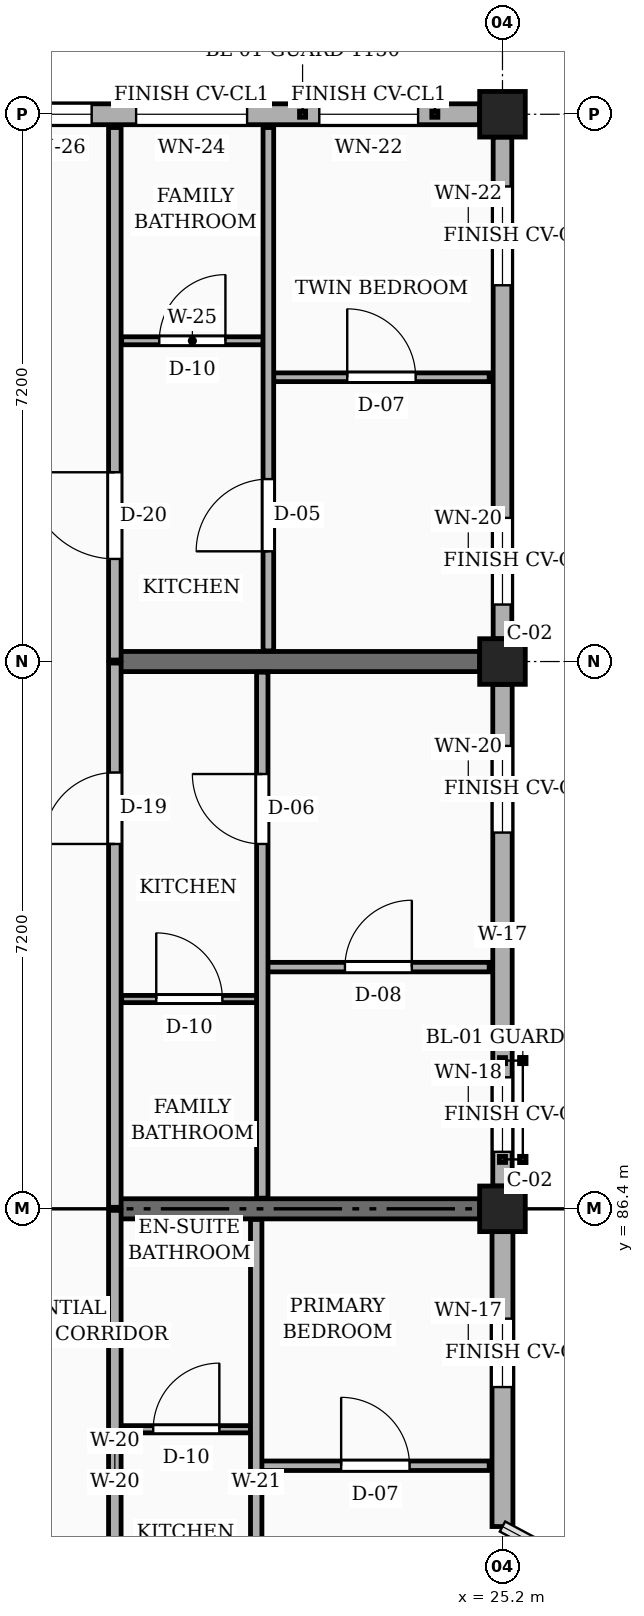
"""IFC4 building model, lengths in metres.
Left out: names, types, materials, properties, quantities, classifications, styles, units other than length and angle.
Written with IfcOpenShell. Run it as: python <this file> out.ifc"""

import sys

from ifc_helpers import new_model, si_unit, direction, frame, frame_2d, origin, origin_2d, place, context, subcontext, project, spatial, rectangle, extrude, element, fill, save


model = new_model("IFC4")
c1 = context("Model", 3, precision=1e-05, world=origin(), true_north=direction((0.0, 1.0)))
c2 = subcontext(c1, "Body", "Model", "MODEL_VIEW")
j1 = project(units=[si_unit("LENGTHUNIT", "METRE"), si_unit("PLANEANGLEUNIT", "RADIAN")], contexts=[c1])
p1 = place(None, origin())
s1 = spatial("IfcSite", under=j1, at=p1, CompositionType="ELEMENT")
p2 = place(p1, origin())
s2 = spatial("IfcBuilding", under=s1, at=p2, CompositionType="ELEMENT")
p3 = place(p2, frame((0.0, 0.0, 7.65)))
s3 = spatial("IfcBuildingStorey", under=s2, at=p3, CompositionType="ELEMENT", Elevation=7.65)
for number, where, z_axis, x_axis in (
    (1, (25.2, 86.4, 0.0), (0.0, 0.0, 1.0), (1.0, 0.0, 0.0)),
    (2, (25.2, 93.6, 0.0), (0.0, 0.0, 1.0), (1.0, 0.0, 0.0)),
    (3, (25.2, 100.8, 0.0), (0.0, 0.0, 1.0), (1.0, 0.0, 0.0)),
):
    element("IfcColumn", number, at=place(p3, frame(where, z_axis=z_axis, x_axis=x_axis)), inside=s3, PredefinedType="COLUMN", context=c2, shape_type="SweptSolid", body=[
        extrude(rectangle(XDim=0.6, YDim=0.6, at=origin_2d()), origin(), (0.0, 0.0, 1.0), 3.15),
    ])
for number, where, z_axis, x_axis in (
    (4, (20.1, 86.4, 0.0), (0.0, 0.0, 1.0), (1.0, 0.0, 0.0)),
    (5, (20.1, 93.6, 0.0), (0.0, 0.0, 1.0), (1.0, 0.0, 0.0)),
):
    element("IfcWall", number, at=place(p3, frame(where, z_axis=z_axis, x_axis=x_axis)), inside=s3, PredefinedType="SOLIDWALL", context=c2, shape_type="SweptSolid", body=[
        extrude(rectangle(XDim=4.8, YDim=0.265, at=frame_2d((2.4, 0.0))), origin(), (0.0, 0.0, 1.0), 2.21),
    ])
p4 = place(p3, frame((25.2, 82.22, 0.0), z_axis=(0.0, 0.0, 1.0), x_axis=(0.0, 1.0, 0.0)))
e6 = element("IfcWall", 6, at=p4, inside=s3, PredefinedType="SOLIDWALL", context=c2, shape_type="SweptSolid", body=[
    extrude(rectangle(XDim=3.88, YDim=0.275, at=frame_2d((1.94, 0.0))), origin(), (0.0, 0.0, 1.0), 2.48),
])
p5 = place(p4, frame((1.835, 0.0, 0.78)))
e7 = element("IfcOpeningElement", 7, at=p5, cuts=e6, PredefinedType="OPENING", context=c2, shape_type="SweptSolid", body=[
    extrude(rectangle(XDim=0.9, YDim=1.36, at=frame_2d((0.45, 0.68))), frame((0.0, 0.147, 0.0), z_axis=(0.0, -1.0, 0.0), x_axis=(1.0, 0.0, 0.0)), (0.0, 0.0, 1.0), 0.295),
])
p6 = place(p3, frame((25.2, 86.7, 0.0), z_axis=(0.0, 0.0, 1.0), x_axis=(0.0, 1.0, 0.0)))
e8 = element("IfcWall", 8, at=p6, inside=s3, PredefinedType="SOLIDWALL", context=c2, shape_type="SweptSolid", body=[
    extrude(rectangle(XDim=6.6, YDim=0.255, at=frame_2d((3.3, 0.0))), origin(), (0.0, 0.0, 1.0), 2.48),
])
p7 = place(p6, frame((0.45, 0.0, 0.78)))
e9 = element("IfcOpeningElement", 9, at=p7, cuts=e8, PredefinedType="OPENING", context=c2, shape_type="SweptSolid", body=[
    extrude(rectangle(XDim=0.98, YDim=1.36, at=frame_2d((0.49, 0.68))), frame((0.0, 0.137, 0.0), z_axis=(0.0, -1.0, 0.0), x_axis=(1.0, 0.0, 0.0)), (0.0, 0.0, 1.0), 0.275),
])
p8 = place(p6, frame((4.65, 0.0, 0.78)))
e10 = element("IfcOpeningElement", 10, at=p8, cuts=e8, PredefinedType="OPENING", context=c2, shape_type="SweptSolid", body=[
    extrude(rectangle(XDim=1.14, YDim=1.36, at=frame_2d((0.57, 0.68))), frame((0.0, 0.137, 0.0), z_axis=(0.0, -1.0, 0.0), x_axis=(1.0, 0.0, 0.0)), (0.0, 0.0, 1.0), 0.275),
])
p9 = place(p3, frame((25.2, 93.9, 0.0), z_axis=(0.0, 0.0, 1.0), x_axis=(0.0, 1.0, 0.0)))
e11 = element("IfcWall", 11, at=p9, inside=s3, PredefinedType="SOLIDWALL", context=c2, shape_type="SweptSolid", body=[
    extrude(rectangle(XDim=6.6, YDim=0.245, at=frame_2d((3.3, 0.0))), origin(), (0.0, 0.0, 1.0), 2.48),
])
p10 = place(p9, frame((0.45, 0.0, 0.78)))
e12 = element("IfcOpeningElement", 12, at=p10, cuts=e11, PredefinedType="OPENING", context=c2, shape_type="SweptSolid", body=[
    extrude(rectangle(XDim=1.14, YDim=1.36, at=frame_2d((0.57, 0.68))), frame((0.0, 0.133, 0.0), z_axis=(0.0, -1.0, 0.0), x_axis=(1.0, 0.0, 0.0)), (0.0, 0.0, 1.0), 0.265),
])
p11 = place(p9, frame((4.65, 0.0, 0.78)))
e13 = element("IfcOpeningElement", 13, at=p11, cuts=e11, PredefinedType="OPENING", context=c2, shape_type="SweptSolid", body=[
    extrude(rectangle(XDim=1.3, YDim=1.36, at=frame_2d((0.65, 0.68))), frame((0.0, 0.133, 0.0), z_axis=(0.0, -1.0, 0.0), x_axis=(1.0, 0.0, 0.0)), (0.0, 0.0, 1.0), 0.265),
])
p12 = place(p3, frame((24.9, 100.8, 0.0), z_axis=(0.0, 0.0, 1.0), x_axis=(-1.0, 0.0, 0.0)))
e14 = element("IfcWall", 14, at=p12, inside=s3, PredefinedType="SOLIDWALL", context=c2, shape_type="SweptSolid", body=[
    extrude(rectangle(XDim=6.6, YDim=0.275, at=frame_2d((3.3, 0.0))), origin(), (0.0, 0.0, 1.0), 2.48),
])
p13 = place(p12, frame((0.81, 0.0, 0.78)))
e15 = element("IfcOpeningElement", 15, at=p13, cuts=e14, PredefinedType="OPENING", context=c2, shape_type="SweptSolid", body=[
    extrude(rectangle(XDim=1.3, YDim=1.36, at=frame_2d((0.65, 0.68))), frame((0.0, 0.147, 0.0), z_axis=(0.0, -1.0, 0.0), x_axis=(1.0, 0.0, 0.0)), (0.0, 0.0, 1.0), 0.295),
])
p14 = place(p12, frame((3.06, 0.0, 0.78)))
e16 = element("IfcOpeningElement", 16, at=p14, cuts=e14, PredefinedType="OPENING", context=c2, shape_type="SweptSolid", body=[
    extrude(rectangle(XDim=1.46, YDim=1.36, at=frame_2d((0.73, 0.68))), frame((0.0, 0.147, 0.0), z_axis=(0.0, -1.0, 0.0), x_axis=(1.0, 0.0, 0.0)), (0.0, 0.0, 1.0), 0.295),
])
p15 = place(p12, frame((5.105, 0.0, 0.78)))
e17 = element("IfcOpeningElement", 17, at=p15, cuts=e14, PredefinedType="OPENING", context=c2, shape_type="SweptSolid", body=[
    extrude(rectangle(XDim=1.05, YDim=1.44, at=frame_2d((0.525, 0.72))), frame((0.0, 0.147, 0.0), z_axis=(0.0, -1.0, 0.0), x_axis=(1.0, 0.0, 0.0)), (0.0, 0.0, 1.0), 0.295),
])
p16 = place(p3, frame((20.1, 79.22, 0.0), z_axis=(0.0, 0.0, 1.0), x_axis=(0.0, 1.0, 0.0)))
e18 = element("IfcWall", 18, at=p16, inside=s3, PredefinedType="PARTITIONING", context=c2, shape_type="SweptSolid", body=[
    extrude(rectangle(XDim=7.16, YDim=0.165, at=frame_2d((3.58, 0.0))), origin(), (0.0, 0.0, 1.0), 2.345),
])
p17 = place(p16, frame((1.33, 0.0, 0.0)))
e19 = element("IfcOpeningElement", 19, at=p17, cuts=e18, PredefinedType="OPENING", context=c2, shape_type="SweptSolid", body=[
    extrude(rectangle(XDim=1.0, YDim=2.15, at=frame_2d((0.5, 1.075))), frame((0.0, 0.093, 0.0), z_axis=(0.0, -1.0, 0.0), x_axis=(1.0, 0.0, 0.0)), (0.0, 0.0, 1.0), 0.185),
])
p18 = place(p3, frame((20.1, 86.42, 0.0), z_axis=(0.0, 0.0, 1.0), x_axis=(0.0, 1.0, 0.0)))
e20 = element("IfcWall", 20, at=p18, inside=s3, PredefinedType="PARTITIONING", context=c2, shape_type="SweptSolid", body=[
    extrude(rectangle(XDim=7.16, YDim=0.165, at=frame_2d((3.58, 0.0))), origin(), (0.0, 0.0, 1.0), 2.345),
])
p19 = place(p18, frame((4.78, 0.0, 0.0)))
e21 = element("IfcOpeningElement", 21, at=p19, cuts=e20, PredefinedType="OPENING", context=c2, shape_type="SweptSolid", body=[
    extrude(rectangle(XDim=0.94, YDim=2.12, at=frame_2d((0.47, 1.06))), frame((0.0, 0.093, 0.0), z_axis=(0.0, -1.0, 0.0), x_axis=(1.0, 0.0, 0.0)), (0.0, 0.0, 1.0), 0.185),
])
p20 = place(p3, frame((20.1, 93.62, 0.0), z_axis=(0.0, 0.0, 1.0), x_axis=(0.0, 1.0, 0.0)))
e22 = element("IfcWall", 22, at=p20, inside=s3, PredefinedType="PARTITIONING", context=c2, shape_type="SweptSolid", body=[
    extrude(rectangle(XDim=7.005, YDim=0.165, at=frame_2d((3.502, 0.0))), origin(), (0.0, 0.0, 1.0), 2.345),
])
p21 = place(p20, frame((1.33, 0.0, 0.0)))
e23 = element("IfcOpeningElement", 23, at=p21, cuts=e22, PredefinedType="OPENING", context=c2, shape_type="SweptSolid", body=[
    extrude(rectangle(XDim=1.14, YDim=2.18, at=frame_2d((0.57, 1.09))), frame((0.0, 0.093, 0.0), z_axis=(0.0, -1.0, 0.0), x_axis=(1.0, 0.0, 0.0)), (0.0, 0.0, 1.0), 0.185),
])
p22 = place(p3, frame((22.03, 83.02, 0.0), z_axis=(0.0, 0.0, 1.0), x_axis=(1.0, 0.0, 0.0)))
e24 = element("IfcWall", 24, at=p22, inside=s3, PredefinedType="PARTITIONING", context=c2, shape_type="SweptSolid", body=[
    extrude(rectangle(XDim=2.995, YDim=0.125, at=frame_2d((1.498, 0.0))), origin(), (0.0, 0.0, 1.0), 2.345),
])
p23 = place(p22, frame((1.048, 0.0, 0.0)))
e25 = element("IfcOpeningElement", 25, at=p23, cuts=e24, PredefinedType="OPENING", context=c2, shape_type="SweptSolid", body=[
    extrude(rectangle(XDim=0.9, YDim=2.1, at=frame_2d((0.45, 1.05))), frame((0.0, 0.073, 0.0), z_axis=(0.0, -1.0, 0.0), x_axis=(1.0, 0.0, 0.0)), (0.0, 0.0, 1.0), 0.145),
])
p24 = place(p3, frame((20.19, 83.5, 0.0), z_axis=(0.0, 0.0, 1.0), x_axis=(1.0, 0.0, 0.0)))
e26 = element("IfcWall", 26, at=p24, inside=s3, PredefinedType="PARTITIONING", context=c2, shape_type="SweptSolid", body=[
    extrude(rectangle(XDim=1.7, YDim=0.095, at=frame_2d((0.85, 0.0))), origin(), (0.0, 0.0, 1.0), 2.345),
])
p25 = place(p24, frame((0.415, 0.0, 0.0)))
e27 = element("IfcOpeningElement", 27, at=p25, cuts=e26, PredefinedType="OPENING", context=c2, shape_type="SweptSolid", body=[
    extrude(rectangle(XDim=0.87, YDim=2.05, at=frame_2d((0.435, 1.025))), frame((0.0, 0.058, 0.0), z_axis=(0.0, -1.0, 0.0), x_axis=(1.0, 0.0, 0.0)), (0.0, 0.0, 1.0), 0.115),
])
p26 = place(p3, frame((21.96, 79.34, 0.0), z_axis=(0.0, 0.0, 1.0), x_axis=(0.0, 1.0, 0.0)))
e28 = element("IfcWall", 28, at=p26, inside=s3, PredefinedType="PARTITIONING", context=c2, shape_type="SweptSolid", body=[
    extrude(rectangle(XDim=6.92, YDim=0.15, at=frame_2d((3.46, 0.0))), origin(), (0.0, 0.0, 1.0), 2.345),
])
p27 = place(p26, frame((1.31, 0.0, 0.0)))
e29 = element("IfcOpeningElement", 29, at=p27, cuts=e28, PredefinedType="OPENING", context=c2, shape_type="SweptSolid", body=[
    extrude(rectangle(XDim=0.95, YDim=2.1, at=frame_2d((0.475, 1.05))), frame((0.0, 0.085, 0.0), z_axis=(0.0, -1.0, 0.0), x_axis=(1.0, 0.0, 0.0)), (0.0, 0.0, 1.0), 0.17),
])
p28 = place(p3, frame((22.11, 89.58, 0.0), z_axis=(0.0, 0.0, 1.0), x_axis=(1.0, 0.0, 0.0)))
e30 = element("IfcWall", 30, at=p28, inside=s3, PredefinedType="PARTITIONING", context=c2, shape_type="SweptSolid", body=[
    extrude(rectangle(XDim=2.915, YDim=0.125, at=frame_2d((1.458, 0.0))), origin(), (0.0, 0.0, 1.0), 2.345),
])
p29 = place(p28, frame((1.018, 0.0, 0.0)))
e31 = element("IfcOpeningElement", 31, at=p29, cuts=e30, PredefinedType="OPENING", context=c2, shape_type="SweptSolid", body=[
    extrude(rectangle(XDim=0.88, YDim=2.08, at=frame_2d((0.44, 1.04))), frame((0.0, 0.073, 0.0), z_axis=(0.0, -1.0, 0.0), x_axis=(1.0, 0.0, 0.0)), (0.0, 0.0, 1.0), 0.145),
])
p30 = place(p3, frame((20.19, 89.16, 0.0), z_axis=(0.0, 0.0, 1.0), x_axis=(1.0, 0.0, 0.0)))
e32 = element("IfcWall", 32, at=p30, inside=s3, PredefinedType="PARTITIONING", context=c2, shape_type="SweptSolid", body=[
    extrude(rectangle(XDim=1.78, YDim=0.095, at=frame_2d((0.89, 0.0))), origin(), (0.0, 0.0, 1.0), 2.345),
])
p31 = place(p30, frame((0.455, 0.0, 0.0)))
e33 = element("IfcOpeningElement", 33, at=p31, cuts=e32, PredefinedType="OPENING", context=c2, shape_type="SweptSolid", body=[
    extrude(rectangle(XDim=0.87, YDim=2.05, at=frame_2d((0.435, 1.025))), frame((0.0, 0.058, 0.0), z_axis=(0.0, -1.0, 0.0), x_axis=(1.0, 0.0, 0.0)), (0.0, 0.0, 1.0), 0.115),
])
p32 = place(p3, frame((22.04, 86.54, 0.0), z_axis=(0.0, 0.0, 1.0), x_axis=(0.0, 1.0, 0.0)))
e34 = element("IfcWall", 34, at=p32, inside=s3, PredefinedType="PARTITIONING", context=c2, shape_type="SweptSolid", body=[
    extrude(rectangle(XDim=6.92, YDim=0.15, at=frame_2d((3.46, 0.0))), origin(), (0.0, 0.0, 1.0), 2.345),
])
p33 = place(p32, frame((4.66, 0.0, 0.0)))
e35 = element("IfcOpeningElement", 35, at=p33, cuts=e34, PredefinedType="OPENING", context=c2, shape_type="SweptSolid", body=[
    extrude(rectangle(XDim=0.92, YDim=2.1, at=frame_2d((0.46, 1.05))), frame((0.0, 0.085, 0.0), z_axis=(0.0, -1.0, 0.0), x_axis=(1.0, 0.0, 0.0)), (0.0, 0.0, 1.0), 0.17),
])
p34 = place(p3, frame((22.19, 97.34, 0.0), z_axis=(0.0, 0.0, 1.0), x_axis=(1.0, 0.0, 0.0)))
e36 = element("IfcWall", 36, at=p34, inside=s3, PredefinedType="PARTITIONING", context=c2, shape_type="SweptSolid", body=[
    extrude(rectangle(XDim=2.835, YDim=0.115, at=frame_2d((1.417, 0.0))), origin(), (0.0, 0.0, 1.0), 2.345),
])
p35 = place(p34, frame((0.968, 0.0, 0.0)))
e37 = element("IfcOpeningElement", 37, at=p35, cuts=e36, PredefinedType="OPENING", context=c2, shape_type="SweptSolid", body=[
    extrude(rectangle(XDim=0.9, YDim=2.1, at=frame_2d((0.45, 1.05))), frame((0.0, 0.067, 0.0), z_axis=(0.0, -1.0, 0.0), x_axis=(1.0, 0.0, 0.0)), (0.0, 0.0, 1.0), 0.135),
])
p36 = place(p3, frame((20.19, 97.82, 0.0), z_axis=(0.0, 0.0, 1.0), x_axis=(1.0, 0.0, 0.0)))
e38 = element("IfcWall", 38, at=p36, inside=s3, PredefinedType="PARTITIONING", context=c2, shape_type="SweptSolid", body=[
    extrude(rectangle(XDim=1.86, YDim=0.105, at=frame_2d((0.93, 0.0))), origin(), (0.0, 0.0, 1.0), 2.345),
])
p37 = place(p36, frame((0.495, 0.0, 0.0)))
e39 = element("IfcOpeningElement", 39, at=p37, cuts=e38, PredefinedType="OPENING", context=c2, shape_type="SweptSolid", body=[
    extrude(rectangle(XDim=0.87, YDim=2.05, at=frame_2d((0.435, 1.025))), frame((0.0, 0.062, 0.0), z_axis=(0.0, -1.0, 0.0), x_axis=(1.0, 0.0, 0.0)), (0.0, 0.0, 1.0), 0.125),
])
p38 = place(p3, frame((22.12, 93.74, 0.0), z_axis=(0.0, 0.0, 1.0), x_axis=(0.0, 1.0, 0.0)))
e40 = element("IfcWall", 40, at=p38, inside=s3, PredefinedType="PARTITIONING", context=c2, shape_type="SweptSolid", body=[
    extrude(rectangle(XDim=6.885, YDim=0.14, at=frame_2d((3.442, 0.0))), origin(), (0.0, 0.0, 1.0), 2.345),
])
p39 = place(p38, frame((1.31, 0.0, 0.0)))
e41 = element("IfcOpeningElement", 41, at=p39, cuts=e40, PredefinedType="OPENING", context=c2, shape_type="SweptSolid", body=[
    extrude(rectangle(XDim=0.95, YDim=2.1, at=frame_2d((0.475, 1.05))), frame((0.0, 0.08, 0.0), z_axis=(0.0, -1.0, 0.0), x_axis=(1.0, 0.0, 0.0)), (0.0, 0.0, 1.0), 0.16),
])
p40 = place(p5, origin())
e42 = element("IfcWindow", 42, at=p40, inside=s3, PartitioningType="SINGLE_PANEL", PredefinedType="WINDOW", context=c2, shape_type="SweptSolid", body=[
    extrude(rectangle(XDim=0.9, YDim=1.36, at=frame_2d((0.45, 0.68))), frame((0.0, 0.03, 0.0), z_axis=(0.0, -1.0, 0.0), x_axis=(1.0, 0.0, 0.0)), (0.0, 0.0, 1.0), 0.06),
])
fill(e7, e42)
p41 = place(p7, origin())
e43 = element("IfcWindow", 43, at=p41, inside=s3, PartitioningType="SINGLE_PANEL", PredefinedType="WINDOW", context=c2, shape_type="SweptSolid", body=[
    extrude(rectangle(XDim=0.98, YDim=1.36, at=frame_2d((0.49, 0.68))), frame((0.0, 0.03, 0.0), z_axis=(0.0, -1.0, 0.0), x_axis=(1.0, 0.0, 0.0)), (0.0, 0.0, 1.0), 0.06),
])
fill(e9, e43)
p42 = place(p8, origin())
e44 = element("IfcWindow", 44, at=p42, inside=s3, PartitioningType="SINGLE_PANEL", PredefinedType="WINDOW", context=c2, shape_type="SweptSolid", body=[
    extrude(rectangle(XDim=1.14, YDim=1.36, at=frame_2d((0.57, 0.68))), frame((0.0, 0.03, 0.0), z_axis=(0.0, -1.0, 0.0), x_axis=(1.0, 0.0, 0.0)), (0.0, 0.0, 1.0), 0.06),
])
fill(e10, e44)
p43 = place(p10, origin())
e45 = element("IfcWindow", 45, at=p43, inside=s3, PartitioningType="SINGLE_PANEL", PredefinedType="WINDOW", context=c2, shape_type="SweptSolid", body=[
    extrude(rectangle(XDim=1.14, YDim=1.36, at=frame_2d((0.57, 0.68))), frame((0.0, 0.03, 0.0), z_axis=(0.0, -1.0, 0.0), x_axis=(1.0, 0.0, 0.0)), (0.0, 0.0, 1.0), 0.06),
])
fill(e12, e45)
p44 = place(p11, origin())
e46 = element("IfcWindow", 46, at=p44, inside=s3, PartitioningType="SINGLE_PANEL", PredefinedType="WINDOW", context=c2, shape_type="SweptSolid", body=[
    extrude(rectangle(XDim=1.3, YDim=1.36, at=frame_2d((0.65, 0.68))), frame((0.0, 0.03, 0.0), z_axis=(0.0, -1.0, 0.0), x_axis=(1.0, 0.0, 0.0)), (0.0, 0.0, 1.0), 0.06),
])
fill(e13, e46)
p45 = place(p13, origin())
e47 = element("IfcWindow", 47, at=p45, inside=s3, PartitioningType="SINGLE_PANEL", PredefinedType="WINDOW", context=c2, shape_type="SweptSolid", body=[
    extrude(rectangle(XDim=1.3, YDim=1.36, at=frame_2d((0.65, 0.68))), frame((0.0, 0.03, 0.0), z_axis=(0.0, -1.0, 0.0), x_axis=(1.0, 0.0, 0.0)), (0.0, 0.0, 1.0), 0.06),
])
fill(e15, e47)
p46 = place(p14, origin())
e48 = element("IfcWindow", 48, at=p46, inside=s3, PartitioningType="SINGLE_PANEL", PredefinedType="WINDOW", context=c2, shape_type="SweptSolid", body=[
    extrude(rectangle(XDim=1.46, YDim=1.36, at=frame_2d((0.73, 0.68))), frame((0.0, 0.03, 0.0), z_axis=(0.0, -1.0, 0.0), x_axis=(1.0, 0.0, 0.0)), (0.0, 0.0, 1.0), 0.06),
])
fill(e16, e48)
p47 = place(p15, origin())
e49 = element("IfcWindow", 49, at=p47, inside=s3, PartitioningType="SINGLE_PANEL", PredefinedType="WINDOW", context=c2, shape_type="SweptSolid", body=[
    extrude(rectangle(XDim=1.05, YDim=1.44, at=frame_2d((0.525, 0.72))), frame((0.0, 0.03, 0.0), z_axis=(0.0, -1.0, 0.0), x_axis=(1.0, 0.0, 0.0)), (0.0, 0.0, 1.0), 0.06),
])
fill(e17, e49)
p48 = place(p19, origin())
e50 = element("IfcDoor", 50, at=p48, inside=s3, OperationType="SINGLE_SWING_LEFT", PredefinedType="DOOR", context=c2, shape_type="SweptSolid", body=[
    extrude(rectangle(XDim=0.94, YDim=2.12, at=frame_2d((0.47, 1.06))), frame((0.0, 0.025, 0.0), z_axis=(0.0, -1.0, 0.0), x_axis=(1.0, 0.0, 0.0)), (0.0, 0.0, 1.0), 0.05),
])
fill(e21, e50)
p49 = place(p21, origin())
e51 = element("IfcDoor", 51, at=p49, inside=s3, OperationType="SINGLE_SWING_RIGHT", PredefinedType="DOOR", context=c2, shape_type="SweptSolid", body=[
    extrude(rectangle(XDim=1.14, YDim=2.18, at=frame_2d((0.57, 1.09))), frame((0.0, 0.025, 0.0), z_axis=(0.0, -1.0, 0.0), x_axis=(1.0, 0.0, 0.0)), (0.0, 0.0, 1.0), 0.05),
])
fill(e23, e51)
p50 = place(p23, origin())
e52 = element("IfcDoor", 52, at=p50, inside=s3, OperationType="SINGLE_SWING_LEFT", PredefinedType="DOOR", context=c2, shape_type="SweptSolid", body=[
    extrude(rectangle(XDim=0.9, YDim=2.1, at=frame_2d((0.45, 1.05))), frame((0.0, 0.025, 0.0), z_axis=(0.0, -1.0, 0.0), x_axis=(1.0, 0.0, 0.0)), (0.0, 0.0, 1.0), 0.05),
])
fill(e25, e52)
p51 = place(p25, origin())
e53 = element("IfcDoor", 53, at=p51, inside=s3, OperationType="SINGLE_SWING_RIGHT", PredefinedType="DOOR", context=c2, shape_type="SweptSolid", body=[
    extrude(rectangle(XDim=0.87, YDim=2.05, at=frame_2d((0.435, 1.025))), frame((0.0, 0.025, 0.0), z_axis=(0.0, -1.0, 0.0), x_axis=(1.0, 0.0, 0.0)), (0.0, 0.0, 1.0), 0.05),
])
fill(e27, e53)
p52 = place(p29, origin())
e54 = element("IfcDoor", 54, at=p52, inside=s3, OperationType="SINGLE_SWING_RIGHT", PredefinedType="DOOR", context=c2, shape_type="SweptSolid", body=[
    extrude(rectangle(XDim=0.88, YDim=2.08, at=frame_2d((0.44, 1.04))), frame((0.0, 0.025, 0.0), z_axis=(0.0, -1.0, 0.0), x_axis=(1.0, 0.0, 0.0)), (0.0, 0.0, 1.0), 0.05),
])
fill(e31, e54)
p53 = place(p31, origin())
e55 = element("IfcDoor", 55, at=p53, inside=s3, OperationType="SINGLE_SWING_LEFT", PredefinedType="DOOR", context=c2, shape_type="SweptSolid", body=[
    extrude(rectangle(XDim=0.87, YDim=2.05, at=frame_2d((0.435, 1.025))), frame((0.0, 0.025, 0.0), z_axis=(0.0, -1.0, 0.0), x_axis=(1.0, 0.0, 0.0)), (0.0, 0.0, 1.0), 0.05),
])
fill(e33, e55)
p54 = place(p33, origin())
e56 = element("IfcDoor", 56, at=p54, inside=s3, OperationType="SINGLE_SWING_RIGHT", PredefinedType="DOOR", context=c2, shape_type="SweptSolid", body=[
    extrude(rectangle(XDim=0.92, YDim=2.1, at=frame_2d((0.46, 1.05))), frame((0.0, 0.025, 0.0), z_axis=(0.0, -1.0, 0.0), x_axis=(1.0, 0.0, 0.0)), (0.0, 0.0, 1.0), 0.05),
])
fill(e35, e56)
p55 = place(p35, origin())
e57 = element("IfcDoor", 57, at=p55, inside=s3, OperationType="SINGLE_SWING_LEFT", PredefinedType="DOOR", context=c2, shape_type="SweptSolid", body=[
    extrude(rectangle(XDim=0.9, YDim=2.1, at=frame_2d((0.45, 1.05))), frame((0.0, 0.025, 0.0), z_axis=(0.0, -1.0, 0.0), x_axis=(1.0, 0.0, 0.0)), (0.0, 0.0, 1.0), 0.05),
])
fill(e37, e57)
p56 = place(p37, origin())
e58 = element("IfcDoor", 58, at=p56, inside=s3, OperationType="SINGLE_SWING_RIGHT", PredefinedType="DOOR", context=c2, shape_type="SweptSolid", body=[
    extrude(rectangle(XDim=0.87, YDim=2.05, at=frame_2d((0.435, 1.025))), frame((0.0, 0.025, 0.0), z_axis=(0.0, -1.0, 0.0), x_axis=(1.0, 0.0, 0.0)), (0.0, 0.0, 1.0), 0.05),
])
fill(e39, e58)
p57 = place(p39, origin())
e59 = element("IfcDoor", 59, at=p57, inside=s3, OperationType="SINGLE_SWING_LEFT", PredefinedType="DOOR", context=c2, shape_type="SweptSolid", body=[
    extrude(rectangle(XDim=0.95, YDim=2.1, at=frame_2d((0.475, 1.05))), frame((0.0, 0.025, 0.0), z_axis=(0.0, -1.0, 0.0), x_axis=(1.0, 0.0, 0.0)), (0.0, 0.0, 1.0), 0.05),
])
fill(e41, e59)
save(model, sys.argv[1])
